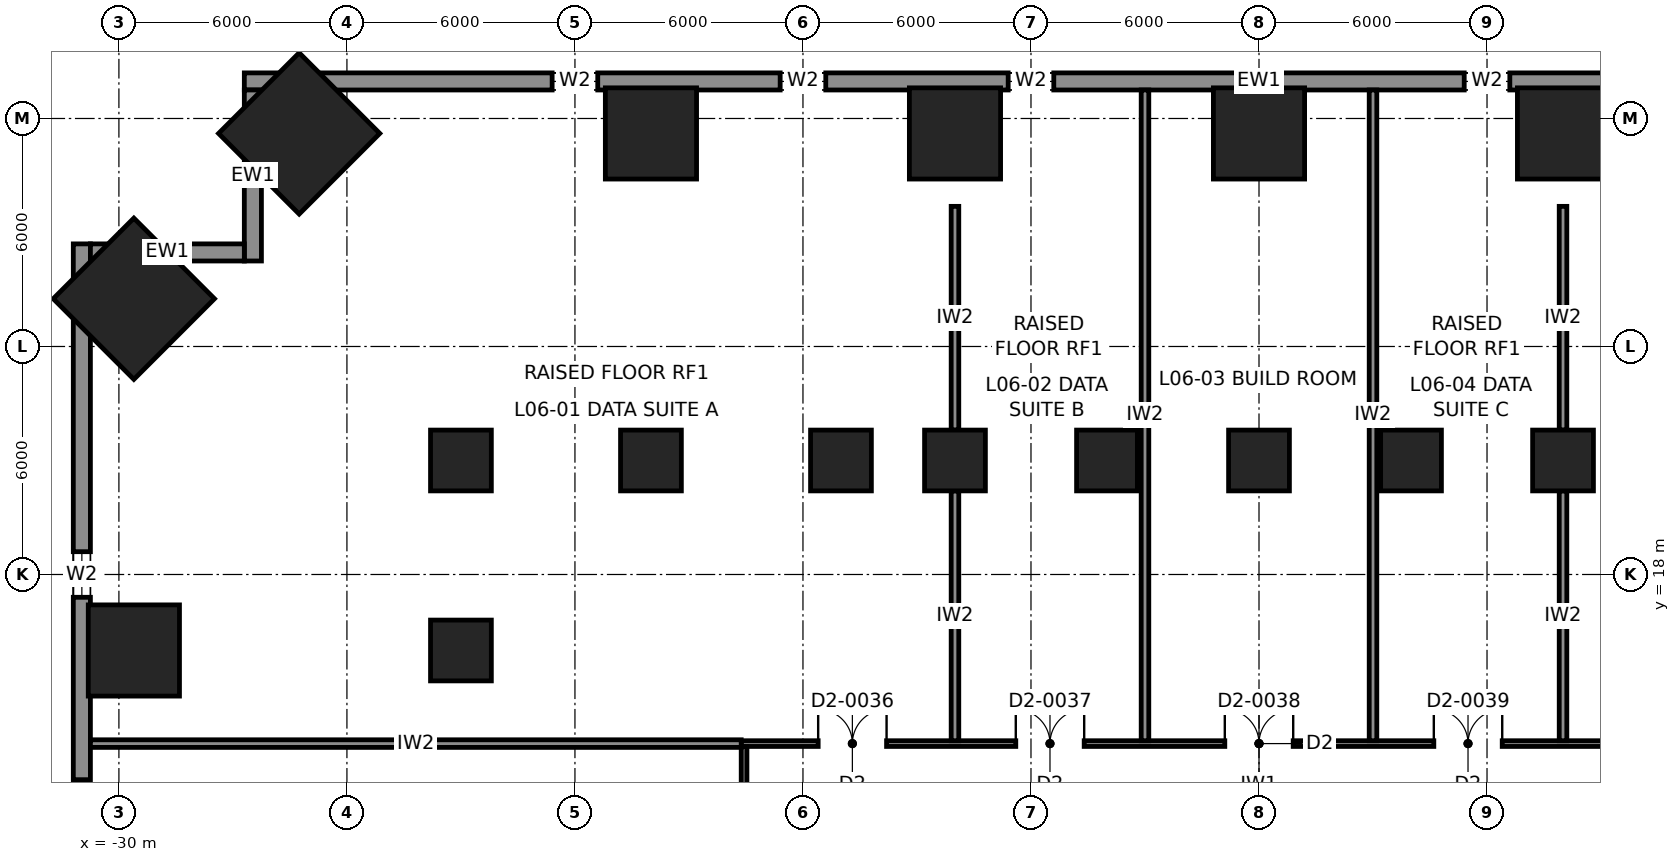
"""IFC4 building model, lengths in metres.
Left out: names, types, materials, properties, quantities, classifications, styles, units other than length and angle.
Written with IfcOpenShell. Run it as: python <this file> out.ifc"""

import sys

from ifc_helpers import new_model, si_unit, direction, frame, frame_2d, origin, origin_2d, place, context, subcontext, project, spatial, rectangle, extrude, element, fill, save


model = new_model("IFC4")
c1 = context("Model", 3, precision=1e-05, world=origin(), true_north=direction((0.0, 1.0)))
c2 = subcontext(c1, "Body", "Model", "MODEL_VIEW")
j1 = project(units=[si_unit("LENGTHUNIT", "METRE"), si_unit("PLANEANGLEUNIT", "RADIAN")], contexts=[c1])
p1 = place(None, origin())
s1 = spatial("IfcSite", under=j1, at=p1, CompositionType="ELEMENT")
p2 = place(p1, origin())
s2 = spatial("IfcBuilding", under=s1, at=p2, CompositionType="ELEMENT")
p3 = place(p2, frame((0.0, 0.0, 32.0)))
s3 = spatial("IfcBuildingStorey", under=s2, at=p3, CompositionType="ELEMENT", Elevation=32.0)
for number, where, z_axis, x_axis in (
    (1, (-29.606, 25.256, 0.0), (0.04, -0.04, 0.998), (0.707, 0.707, 0.0)),
    (2, (-25.256, 29.606, 0.0), (0.04, -0.04, 0.998), (0.707, 0.707, 0.0)),
):
    element("IfcColumn", number, at=place(p3, frame(where, z_axis=z_axis, x_axis=x_axis)), inside=s3, PredefinedType="COLUMN", context=c2, shape_type="SweptSolid", body=[
        extrude(rectangle(XDim=3.0, YDim=3.0, at=origin_2d()), origin(), (0.0, 0.0, 1.0), 5.509),
    ])
for number, where, z_axis, x_axis in (
    (3, (0.0, 29.606, 0.0), (0.0, -0.04, 0.999), (1.0, 0.0, 0.0)),
    (4, (8.0, 29.606, 0.0), (0.0, -0.04, 0.999), (1.0, 0.0, 0.0)),
    (5, (-8.0, 29.606, 0.0), (0.0, -0.04, 0.999), (1.0, 0.0, 0.0)),
    (6, (-16.0, 29.606, 0.0), (0.0, -0.04, 0.999), (1.0, 0.0, 0.0)),
    (7, (-29.606, 16.0, 0.0), (0.04, 0.0, 0.999), (0.0, 1.0, 0.0)),
):
    element("IfcColumn", number, at=place(p3, frame(where, z_axis=z_axis, x_axis=x_axis)), inside=s3, PredefinedType="COLUMN", context=c2, shape_type="SweptSolid", body=[
        extrude(rectangle(XDim=2.4, YDim=2.4, at=origin_2d()), origin(), (0.0, 0.0, 1.0), 5.504),
    ])
for number, where, z_axis, x_axis in (
    (8, (0.0, 21.0, 0.0), (0.0, 0.0, 1.0), (1.0, 0.0, 0.0)),
    (9, (4.0, 21.0, 0.0), (0.0, 0.0, 1.0), (1.0, 0.0, 0.0)),
    (10, (-4.0, 21.0, 0.0), (0.0, 0.0, 1.0), (1.0, 0.0, 0.0)),
    (11, (8.0, 21.0, 0.0), (0.0, 0.0, 1.0), (1.0, 0.0, 0.0)),
    (12, (-8.0, 21.0, 0.0), (0.0, 0.0, 1.0), (1.0, 0.0, 0.0)),
    (13, (-11.0, 21.0, 0.0), (0.0, 0.0, 1.0), (1.0, 0.0, 0.0)),
    (14, (-16.0, 21.0, 0.0), (0.0, 0.0, 1.0), (1.0, 0.0, 0.0)),
    (15, (-21.0, 16.0, 0.0), (0.0, 0.0, 1.0), (1.0, 0.0, 0.0)),
    (16, (-21.0, 21.0, 0.0), (0.0, 0.0, 1.0), (1.0, 0.0, 0.0)),
):
    element("IfcColumn", number, at=place(p3, frame(where, z_axis=z_axis, x_axis=x_axis)), inside=s3, PredefinedType="COLUMN", context=c2, shape_type="SweptSolid", body=[
        extrude(rectangle(XDim=1.6, YDim=1.6, at=origin_2d()), origin(), (0.0, 0.0, 1.0), 5.5),
    ])
p4 = place(p3, frame((26.7, 30.975, 0.0), z_axis=(0.0, 0.0, 1.0), x_axis=(-1.0, 0.0, 0.0)))
e17 = element("IfcWall", 17, at=p4, inside=s3, PredefinedType="SOLIDWALL", context=c2, shape_type="SweptSolid", body=[
    extrude(rectangle(XDim=53.4, YDim=0.45, at=frame_2d((26.7, 0.0))), origin(), (0.0, 0.0, 1.0), 5.3),
])
p5 = place(p4, frame((8.1, 0.0, 0.9)))
e18 = element("IfcOpeningElement", 18, at=p5, cuts=e17, PredefinedType="OPENING", context=c2, shape_type="SweptSolid", body=[
    extrude(rectangle(XDim=1.2, YDim=2.0, at=frame_2d((0.6, 1.0))), frame((0.0, 0.235, 0.0), z_axis=(0.0, -1.0, 0.0), x_axis=(1.0, 0.0, 0.0)), (0.0, 0.0, 1.0), 0.47),
])
p6 = place(p4, frame((14.1, 0.0, 0.9)))
e19 = element("IfcOpeningElement", 19, at=p6, cuts=e17, PredefinedType="OPENING", context=c2, shape_type="SweptSolid", body=[
    extrude(rectangle(XDim=1.2, YDim=2.0, at=frame_2d((0.6, 1.0))), frame((0.0, 0.235, 0.0), z_axis=(0.0, -1.0, 0.0), x_axis=(1.0, 0.0, 0.0)), (0.0, 0.0, 1.0), 0.47),
])
p7 = place(p4, frame((20.1, 0.0, 0.9)))
e20 = element("IfcOpeningElement", 20, at=p7, cuts=e17, PredefinedType="OPENING", context=c2, shape_type="SweptSolid", body=[
    extrude(rectangle(XDim=1.2, YDim=2.0, at=frame_2d((0.6, 1.0))), frame((0.0, 0.235, 0.0), z_axis=(0.0, -1.0, 0.0), x_axis=(1.0, 0.0, 0.0)), (0.0, 0.0, 1.0), 0.47),
])
p8 = place(p4, frame((32.1, 0.0, 0.9)))
e21 = element("IfcOpeningElement", 21, at=p8, cuts=e17, PredefinedType="OPENING", context=c2, shape_type="SweptSolid", body=[
    extrude(rectangle(XDim=1.2, YDim=2.0, at=frame_2d((0.6, 1.0))), frame((0.0, 0.235, 0.0), z_axis=(0.0, -1.0, 0.0), x_axis=(1.0, 0.0, 0.0)), (0.0, 0.0, 1.0), 0.47),
])
p9 = place(p4, frame((38.1, 0.0, 0.9)))
e22 = element("IfcOpeningElement", 22, at=p9, cuts=e17, PredefinedType="OPENING", context=c2, shape_type="SweptSolid", body=[
    extrude(rectangle(XDim=1.2, YDim=2.0, at=frame_2d((0.6, 1.0))), frame((0.0, 0.235, 0.0), z_axis=(0.0, -1.0, 0.0), x_axis=(1.0, 0.0, 0.0)), (0.0, 0.0, 1.0), 0.47),
])
p10 = place(p4, frame((44.1, 0.0, 0.9)))
e23 = element("IfcOpeningElement", 23, at=p10, cuts=e17, PredefinedType="OPENING", context=c2, shape_type="SweptSolid", body=[
    extrude(rectangle(XDim=1.2, YDim=2.0, at=frame_2d((0.6, 1.0))), frame((0.0, 0.235, 0.0), z_axis=(0.0, -1.0, 0.0), x_axis=(1.0, 0.0, 0.0)), (0.0, 0.0, 1.0), 0.47),
])
p11 = place(p3, frame((-30.975, 26.7, 0.0), z_axis=(0.0, 0.0, 1.0), x_axis=(0.0, -1.0, 0.0)))
e24 = element("IfcWall", 24, at=p11, inside=s3, PredefinedType="SOLIDWALL", context=c2, shape_type="SweptSolid", body=[
    extrude(rectangle(XDim=53.4, YDim=0.45, at=frame_2d((26.7, 0.0))), origin(), (0.0, 0.0, 1.0), 5.3),
])
p12 = place(p11, frame((8.1, 0.0, 0.9)))
e25 = element("IfcOpeningElement", 25, at=p12, cuts=e24, PredefinedType="OPENING", context=c2, shape_type="SweptSolid", body=[
    extrude(rectangle(XDim=1.2, YDim=2.0, at=frame_2d((0.6, 1.0))), frame((0.0, 0.235, 0.0), z_axis=(0.0, -1.0, 0.0), x_axis=(1.0, 0.0, 0.0)), (0.0, 0.0, 1.0), 0.47),
])
p13 = place(p11, frame((14.1, 0.0, 0.9)))
e26 = element("IfcOpeningElement", 26, at=p13, cuts=e24, PredefinedType="OPENING", context=c2, shape_type="SweptSolid", body=[
    extrude(rectangle(XDim=1.2, YDim=2.0, at=frame_2d((0.6, 1.0))), frame((0.0, 0.235, 0.0), z_axis=(0.0, -1.0, 0.0), x_axis=(1.0, 0.0, 0.0)), (0.0, 0.0, 1.0), 0.47),
])
p14 = place(p11, frame((20.1, 0.0, 0.9)))
e27 = element("IfcOpeningElement", 27, at=p14, cuts=e24, PredefinedType="OPENING", context=c2, shape_type="SweptSolid", body=[
    extrude(rectangle(XDim=1.2, YDim=2.0, at=frame_2d((0.6, 1.0))), frame((0.0, 0.235, 0.0), z_axis=(0.0, -1.0, 0.0), x_axis=(1.0, 0.0, 0.0)), (0.0, 0.0, 1.0), 0.47),
])
p15 = place(p11, frame((32.1, 0.0, 0.9)))
e28 = element("IfcOpeningElement", 28, at=p15, cuts=e24, PredefinedType="OPENING", context=c2, shape_type="SweptSolid", body=[
    extrude(rectangle(XDim=1.2, YDim=2.0, at=frame_2d((0.6, 1.0))), frame((0.0, 0.235, 0.0), z_axis=(0.0, -1.0, 0.0), x_axis=(1.0, 0.0, 0.0)), (0.0, 0.0, 1.0), 0.47),
])
p16 = place(p11, frame((38.1, 0.0, 0.9)))
e29 = element("IfcOpeningElement", 29, at=p16, cuts=e24, PredefinedType="OPENING", context=c2, shape_type="SweptSolid", body=[
    extrude(rectangle(XDim=1.2, YDim=2.0, at=frame_2d((0.6, 1.0))), frame((0.0, 0.235, 0.0), z_axis=(0.0, -1.0, 0.0), x_axis=(1.0, 0.0, 0.0)), (0.0, 0.0, 1.0), 0.47),
])
p17 = place(p11, frame((44.1, 0.0, 0.9)))
e30 = element("IfcOpeningElement", 30, at=p17, cuts=e24, PredefinedType="OPENING", context=c2, shape_type="SweptSolid", body=[
    extrude(rectangle(XDim=1.2, YDim=2.0, at=frame_2d((0.6, 1.0))), frame((0.0, 0.235, 0.0), z_axis=(0.0, -1.0, 0.0), x_axis=(1.0, 0.0, 0.0)), (0.0, 0.0, 1.0), 0.47),
])
p18 = place(p3, frame((-26.475, 26.25, 0.0), z_axis=(0.0, 0.0, 1.0), x_axis=(0.0, 1.0, 0.0)))
e31 = element("IfcWall", 31, at=p18, inside=s3, PredefinedType="SOLIDWALL", context=c2, shape_type="SweptSolid", body=[
    extrude(rectangle(XDim=4.5, YDim=0.45, at=frame_2d((2.25, 0.0))), origin(), (0.0, 0.0, 1.0), 5.3),
])
p19 = place(p3, frame((-26.7, 26.475, 0.0), z_axis=(0.0, 0.0, 1.0), x_axis=(-1.0, 0.0, 0.0)))
e32 = element("IfcWall", 32, at=p19, inside=s3, PredefinedType="SOLIDWALL", context=c2, shape_type="SweptSolid", body=[
    extrude(rectangle(XDim=4.05, YDim=0.45, at=frame_2d((2.025, 0.0))), origin(), (0.0, 0.0, 1.0), 5.3),
])
p20 = place(p3, frame((-13.625, 13.55, 0.0), z_axis=(0.0, 0.0, 1.0), x_axis=(1.0, 0.0, 0.0)))
e33 = element("IfcWall", 33, at=p20, inside=s3, PredefinedType="PARTITIONING", context=c2, shape_type="SweptSolid", body=[
    extrude(rectangle(XDim=27.25, YDim=0.15, at=frame_2d((13.625, 0.0))), origin(), (0.0, 0.0, 1.0), 5.3),
])
p21 = place(p20, frame((2.025, 0.0, 0.0)))
e34 = element("IfcOpeningElement", 34, at=p21, cuts=e33, PredefinedType="OPENING", context=c2, shape_type="SweptSolid", body=[
    extrude(rectangle(XDim=1.8, YDim=2.3, at=frame_2d((0.9, 1.15))), frame((0.0, 0.085, 0.0), z_axis=(0.0, -1.0, 0.0), x_axis=(1.0, 0.0, 0.0)), (0.0, 0.0, 1.0), 0.17),
])
p22 = place(p20, frame((7.225, 0.0, 0.0)))
e35 = element("IfcOpeningElement", 35, at=p22, cuts=e33, PredefinedType="OPENING", context=c2, shape_type="SweptSolid", body=[
    extrude(rectangle(XDim=1.8, YDim=2.3, at=frame_2d((0.9, 1.15))), frame((0.0, 0.085, 0.0), z_axis=(0.0, -1.0, 0.0), x_axis=(1.0, 0.0, 0.0)), (0.0, 0.0, 1.0), 0.17),
])
p23 = place(p20, frame((12.725, 0.0, 0.0)))
e36 = element("IfcOpeningElement", 36, at=p23, cuts=e33, PredefinedType="OPENING", context=c2, shape_type="SweptSolid", body=[
    extrude(rectangle(XDim=1.8, YDim=2.3, at=frame_2d((0.9, 1.15))), frame((0.0, 0.085, 0.0), z_axis=(0.0, -1.0, 0.0), x_axis=(1.0, 0.0, 0.0)), (0.0, 0.0, 1.0), 0.17),
])
p24 = place(p20, frame((18.225, 0.0, 0.0)))
e37 = element("IfcOpeningElement", 37, at=p24, cuts=e33, PredefinedType="OPENING", context=c2, shape_type="SweptSolid", body=[
    extrude(rectangle(XDim=1.8, YDim=2.3, at=frame_2d((0.9, 1.15))), frame((0.0, 0.085, 0.0), z_axis=(0.0, -1.0, 0.0), x_axis=(1.0, 0.0, 0.0)), (0.0, 0.0, 1.0), 0.17),
])
p25 = place(p20, frame((23.425, 0.0, 0.0)))
e38 = element("IfcOpeningElement", 38, at=p25, cuts=e33, PredefinedType="OPENING", context=c2, shape_type="SweptSolid", body=[
    extrude(rectangle(XDim=1.8, YDim=2.3, at=frame_2d((0.9, 1.15))), frame((0.0, 0.085, 0.0), z_axis=(0.0, -1.0, 0.0), x_axis=(1.0, 0.0, 0.0)), (0.0, 0.0, 1.0), 0.17),
])
p26 = place(p3, frame((-13.55, 13.475, 0.0), z_axis=(0.0, 0.0, 1.0), x_axis=(0.0, -1.0, 0.0)))
e39 = element("IfcWall", 39, at=p26, inside=s3, PredefinedType="PARTITIONING", context=c2, shape_type="SweptSolid", body=[
    extrude(rectangle(XDim=26.95, YDim=0.15, at=frame_2d((13.475, 0.0))), origin(), (0.0, 0.0, 1.0), 5.3),
])
p27 = place(p26, frame((19.675, 0.0, 0.0)))
e40 = element("IfcOpeningElement", 40, at=p27, cuts=e39, PredefinedType="OPENING", context=c2, shape_type="SweptSolid", body=[
    extrude(rectangle(XDim=1.0, YDim=2.3, at=frame_2d((0.5, 1.15))), frame((0.0, 0.085, 0.0), z_axis=(0.0, -1.0, 0.0), x_axis=(1.0, 0.0, 0.0)), (0.0, 0.0, 1.0), 0.17),
])
p28 = place(p26, frame((8.525, 0.0, 0.0)))
e41 = element("IfcOpeningElement", 41, at=p28, cuts=e39, PredefinedType="OPENING", context=c2, shape_type="SweptSolid", body=[
    extrude(rectangle(XDim=1.8, YDim=2.3, at=frame_2d((0.9, 1.15))), frame((0.0, 0.085, 0.0), z_axis=(0.0, -1.0, 0.0), x_axis=(1.0, 0.0, 0.0)), (0.0, 0.0, 1.0), 0.17),
])
p29 = place(p26, frame((3.225, 0.0, 0.0)))
e42 = element("IfcOpeningElement", 42, at=p29, cuts=e39, PredefinedType="OPENING", context=c2, shape_type="SweptSolid", body=[
    extrude(rectangle(XDim=1.0, YDim=2.3, at=frame_2d((0.5, 1.15))), frame((0.0, 0.085, 0.0), z_axis=(0.0, -1.0, 0.0), x_axis=(1.0, 0.0, 0.0)), (0.0, 0.0, 1.0), 0.17),
])
p30 = place(p3, frame((-30.75, 13.55, 0.0), z_axis=(0.0, 0.0, 1.0), x_axis=(1.0, 0.0, 0.0)))
e43 = element("IfcWall", 43, at=p30, inside=s3, PredefinedType="PARTITIONING", context=c2, shape_type="SweptSolid", body=[
    extrude(rectangle(XDim=17.125, YDim=0.2, at=frame_2d((8.562, 0.0))), origin(), (0.0, 0.0, 1.0), 5.3),
])
p31 = place(p3, frame((-8.0, 13.625, 0.0), z_axis=(0.0, 0.0, 1.0), x_axis=(0.0, 1.0, 0.0)))
e44 = element("IfcWall", 44, at=p31, inside=s3, PredefinedType="PARTITIONING", context=c2, shape_type="SweptSolid", body=[
    extrude(rectangle(XDim=6.575, YDim=0.2, at=frame_2d((3.288, 0.0))), origin(), (0.0, 0.0, 1.0), 4.731),
])
p32 = place(p3, frame((-8.0, 21.8, 0.0), z_axis=(0.0, 0.0, 1.0), x_axis=(0.0, 1.0, 0.0)))
e45 = element("IfcWall", 45, at=p32, inside=s3, PredefinedType="PARTITIONING", context=c2, shape_type="SweptSolid", body=[
    extrude(rectangle(XDim=5.887, YDim=0.2, at=frame_2d((2.944, 0.0))), origin(), (0.0, 0.0, 1.0), 4.731),
])
for number, where, z_axis, x_axis in (
    (46, (-3.0, 13.625, 0.0), (0.0, 0.0, 1.0), (0.0, 1.0, 0.0)),
    (47, (3.0, 13.625, 0.0), (0.0, 0.0, 1.0), (0.0, 1.0, 0.0)),
):
    element("IfcWall", number, at=place(p3, frame(where, z_axis=z_axis, x_axis=x_axis)), inside=s3, PredefinedType="PARTITIONING", context=c2, shape_type="SweptSolid", body=[
        extrude(rectangle(XDim=17.125, YDim=0.2, at=frame_2d((8.562, 0.0))), origin(), (0.0, 0.0, 1.0), 5.3),
    ])
p33 = place(p3, frame((8.0, 13.625, 0.0), z_axis=(0.0, 0.0, 1.0), x_axis=(0.0, 1.0, 0.0)))
e48 = element("IfcWall", 48, at=p33, inside=s3, PredefinedType="PARTITIONING", context=c2, shape_type="SweptSolid", body=[
    extrude(rectangle(XDim=6.575, YDim=0.2, at=frame_2d((3.288, 0.0))), origin(), (0.0, 0.0, 1.0), 4.731),
])
p34 = place(p3, frame((8.0, 21.8, 0.0), z_axis=(0.0, 0.0, 1.0), x_axis=(0.0, 1.0, 0.0)))
e49 = element("IfcWall", 49, at=p34, inside=s3, PredefinedType="PARTITIONING", context=c2, shape_type="SweptSolid", body=[
    extrude(rectangle(XDim=5.887, YDim=0.2, at=frame_2d((2.944, 0.0))), origin(), (0.0, 0.0, 1.0), 4.731),
])
p35 = place(p7, origin())
e50 = element("IfcWindow", 50, at=p35, inside=s3, PartitioningType="SINGLE_PANEL", PredefinedType="WINDOW", context=c2, shape_type="SweptSolid", body=[
    extrude(rectangle(XDim=1.2, YDim=2.0, at=frame_2d((0.6, 1.0))), frame((0.0, 0.03, 0.0), z_axis=(0.0, -1.0, 0.0), x_axis=(1.0, 0.0, 0.0)), (0.0, 0.0, 1.0), 0.06),
])
fill(e20, e50)
p36 = place(p8, origin())
e51 = element("IfcWindow", 51, at=p36, inside=s3, PartitioningType="SINGLE_PANEL", PredefinedType="WINDOW", context=c2, shape_type="SweptSolid", body=[
    extrude(rectangle(XDim=1.2, YDim=2.0, at=frame_2d((0.6, 1.0))), frame((0.0, 0.03, 0.0), z_axis=(0.0, -1.0, 0.0), x_axis=(1.0, 0.0, 0.0)), (0.0, 0.0, 1.0), 0.06),
])
fill(e21, e51)
p37 = place(p9, origin())
e52 = element("IfcWindow", 52, at=p37, inside=s3, PartitioningType="SINGLE_PANEL", PredefinedType="WINDOW", context=c2, shape_type="SweptSolid", body=[
    extrude(rectangle(XDim=1.2, YDim=2.0, at=frame_2d((0.6, 1.0))), frame((0.0, 0.03, 0.0), z_axis=(0.0, -1.0, 0.0), x_axis=(1.0, 0.0, 0.0)), (0.0, 0.0, 1.0), 0.06),
])
fill(e22, e52)
p38 = place(p10, origin())
e53 = element("IfcWindow", 53, at=p38, inside=s3, PartitioningType="SINGLE_PANEL", PredefinedType="WINDOW", context=c2, shape_type="SweptSolid", body=[
    extrude(rectangle(XDim=1.2, YDim=2.0, at=frame_2d((0.6, 1.0))), frame((0.0, 0.03, 0.0), z_axis=(0.0, -1.0, 0.0), x_axis=(1.0, 0.0, 0.0)), (0.0, 0.0, 1.0), 0.06),
])
fill(e23, e53)
p39 = place(p12, origin())
e54 = element("IfcWindow", 54, at=p39, inside=s3, PartitioningType="SINGLE_PANEL", PredefinedType="WINDOW", context=c2, shape_type="SweptSolid", body=[
    extrude(rectangle(XDim=1.2, YDim=2.0, at=frame_2d((0.6, 1.0))), frame((0.0, 0.03, 0.0), z_axis=(0.0, -1.0, 0.0), x_axis=(1.0, 0.0, 0.0)), (0.0, 0.0, 1.0), 0.06),
])
fill(e25, e54)
p40 = place(p13, origin())
e55 = element("IfcWindow", 55, at=p40, inside=s3, PartitioningType="SINGLE_PANEL", PredefinedType="WINDOW", context=c2, shape_type="SweptSolid", body=[
    extrude(rectangle(XDim=1.2, YDim=2.0, at=frame_2d((0.6, 1.0))), frame((0.0, 0.03, 0.0), z_axis=(0.0, -1.0, 0.0), x_axis=(1.0, 0.0, 0.0)), (0.0, 0.0, 1.0), 0.06),
])
fill(e26, e55)
p41 = place(p21, origin())
e56 = element("IfcDoor", 56, at=p41, inside=s3, OperationType="DOUBLE_DOOR_DOUBLE_SWING", PredefinedType="DOOR", context=c2, shape_type="SweptSolid", body=[
    extrude(rectangle(XDim=1.8, YDim=2.3, at=frame_2d((0.9, 1.15))), frame((0.0, 0.025, 0.0), z_axis=(0.0, -1.0, 0.0), x_axis=(1.0, 0.0, 0.0)), (0.0, 0.0, 1.0), 0.05),
])
fill(e34, e56)
p42 = place(p22, origin())
e57 = element("IfcDoor", 57, at=p42, inside=s3, OperationType="DOUBLE_DOOR_DOUBLE_SWING", PredefinedType="DOOR", context=c2, shape_type="SweptSolid", body=[
    extrude(rectangle(XDim=1.8, YDim=2.3, at=frame_2d((0.9, 1.15))), frame((0.0, 0.025, 0.0), z_axis=(0.0, -1.0, 0.0), x_axis=(1.0, 0.0, 0.0)), (0.0, 0.0, 1.0), 0.05),
])
fill(e35, e57)
p43 = place(p23, origin())
e58 = element("IfcDoor", 58, at=p43, inside=s3, OperationType="DOUBLE_DOOR_DOUBLE_SWING", PredefinedType="DOOR", context=c2, shape_type="SweptSolid", body=[
    extrude(rectangle(XDim=1.8, YDim=2.3, at=frame_2d((0.9, 1.15))), frame((0.0, 0.025, 0.0), z_axis=(0.0, -1.0, 0.0), x_axis=(1.0, 0.0, 0.0)), (0.0, 0.0, 1.0), 0.05),
])
fill(e36, e58)
p44 = place(p24, origin())
e59 = element("IfcDoor", 59, at=p44, inside=s3, OperationType="DOUBLE_DOOR_DOUBLE_SWING", PredefinedType="DOOR", context=c2, shape_type="SweptSolid", body=[
    extrude(rectangle(XDim=1.8, YDim=2.3, at=frame_2d((0.9, 1.15))), frame((0.0, 0.025, 0.0), z_axis=(0.0, -1.0, 0.0), x_axis=(1.0, 0.0, 0.0)), (0.0, 0.0, 1.0), 0.05),
])
fill(e37, e59)
save(model, sys.argv[1])
